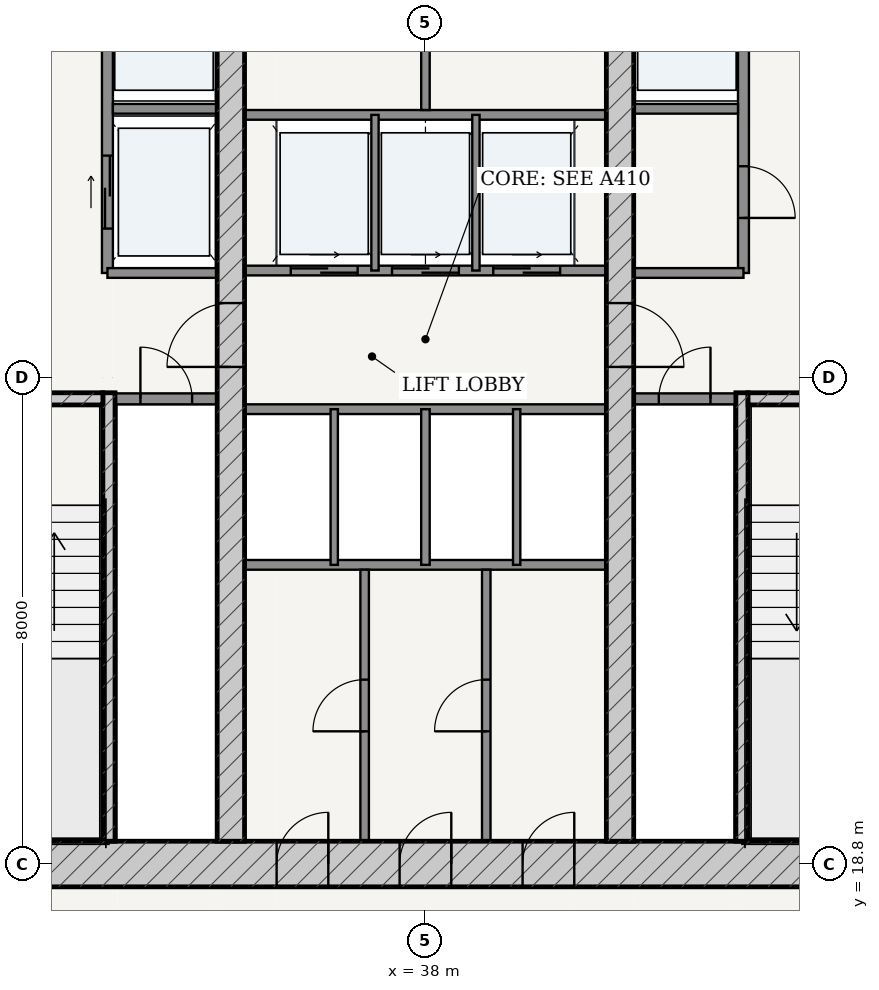
"""IFC4 building model, lengths in metres.
Left out: names, types, materials, properties, quantities, classifications, styles, units other than length and angle.
Written with IfcOpenShell. Run it as: python <this file> out.ifc"""

import sys

from ifc_helpers import new_model, si_unit, direction, frame, frame_2d, origin, place, context, subcontext, project, spatial, rectangle, extrude, source, transform, mapped, element, fill, save


model = new_model("IFC4")
c1 = context("Model", 3, precision=1e-05, world=origin(), true_north=direction((-0.2419218956, 0.970295726276)))
c2 = subcontext(c1, "Body", "Model", "MODEL_VIEW")
j1 = project(units=[si_unit("LENGTHUNIT", "METRE"), si_unit("PLANEANGLEUNIT", "RADIAN")], contexts=[c1])
p1 = place(None, origin())
s1 = spatial("IfcSite", under=j1, at=p1, CompositionType="ELEMENT")
p2 = place(p1, origin())
s2 = spatial("IfcBuilding", under=s1, at=p2, CompositionType="ELEMENT")
p3 = place(p2, frame((0.0, 0.0, 34.8)))
s3 = spatial("IfcBuildingStorey", under=s2, at=p3, CompositionType="ELEMENT", Elevation=34.8)
p4 = place(p3, frame((28.625, 18.8, 0.0), z_axis=(0.0, 0.0, 1.0), x_axis=(1.0, 0.0, 0.0)))
e1 = element("IfcWall", 1, at=p4, inside=s3, PredefinedType="SHEAR", context=c2, shape_type="SweptSolid", body=[
    extrude(rectangle(XDim=18.75, YDim=0.75, at=frame_2d((9.375, 0.0))), origin(), (0.0, 0.0, 1.0), 3.32),
])
p5 = place(p4, frame((6.927, 0.0, 0.0)))
e2 = element("IfcOpeningElement", 2, at=p5, cuts=e1, PredefinedType="OPENING", context=c2, shape_type="SweptSolid", body=[
    extrude(rectangle(XDim=0.85, YDim=2.1, at=frame_2d((0.425, 1.05))), frame((0.0, 0.385, 0.0), z_axis=(0.0, -1.0, 0.0), x_axis=(1.0, 0.0, 0.0)), (0.0, 0.0, 1.0), 0.77),
])
p6 = place(p4, frame((8.95, 0.0, 0.0)))
e3 = element("IfcOpeningElement", 3, at=p6, cuts=e1, PredefinedType="OPENING", context=c2, shape_type="SweptSolid", body=[
    extrude(rectangle(XDim=0.85, YDim=2.1, at=frame_2d((0.425, 1.05))), frame((0.0, 0.385, 0.0), z_axis=(0.0, -1.0, 0.0), x_axis=(1.0, 0.0, 0.0)), (0.0, 0.0, 1.0), 0.77),
])
p7 = place(p4, frame((10.972, 0.0, 0.0)))
e4 = element("IfcOpeningElement", 4, at=p7, cuts=e1, PredefinedType="OPENING", context=c2, shape_type="SweptSolid", body=[
    extrude(rectangle(XDim=0.85, YDim=2.1, at=frame_2d((0.425, 1.05))), frame((0.0, 0.385, 0.0), z_axis=(0.0, -1.0, 0.0), x_axis=(1.0, 0.0, 0.0)), (0.0, 0.0, 1.0), 0.77),
])
p8 = place(p3, frame((32.795, 19.175, 0.0), z_axis=(0.0, 0.0, 1.0), x_axis=(0.0, 1.0, 0.0)))
e5 = element("IfcWall", 5, at=p8, inside=s3, PredefinedType="SOLIDWALL", context=c2, shape_type="SweptSolid", body=[
    extrude(rectangle(XDim=7.375, YDim=0.2, at=frame_2d((3.688, 0.0))), origin(), (0.0, 0.0, 1.0), 3.32),
])
p9 = place(p3, frame((29.375, 26.45, 0.0), z_axis=(0.0, 0.0, 1.0), x_axis=(1.0, 0.0, 0.0)))
e6 = element("IfcWall", 6, at=p9, inside=s3, PredefinedType="SOLIDWALL", context=c2, shape_type="SweptSolid", body=[
    extrude(rectangle(XDim=3.32, YDim=0.2, at=frame_2d((1.66, 0.0))), origin(), (0.0, 0.0, 1.0), 3.32),
])
p10 = place(p9, frame((1.185, 0.0, 0.0)))
e7 = element("IfcOpeningElement", 7, at=p10, cuts=e6, PredefinedType="OPENING", context=c2, shape_type="SweptSolid", body=[
    extrude(rectangle(XDim=0.95, YDim=2.15, at=frame_2d((0.475, 1.075))), frame((0.0, 0.11, 0.0), z_axis=(0.0, -1.0, 0.0), x_axis=(1.0, 0.0, 0.0)), (0.0, 0.0, 1.0), 0.22),
])
p11 = place(p3, frame((43.205, 19.175, 0.0), z_axis=(0.0, 0.0, 1.0), x_axis=(0.0, 1.0, 0.0)))
e8 = element("IfcWall", 8, at=p11, inside=s3, PredefinedType="SOLIDWALL", context=c2, shape_type="SweptSolid", body=[
    extrude(rectangle(XDim=7.375, YDim=0.2, at=frame_2d((3.688, 0.0))), origin(), (0.0, 0.0, 1.0), 3.32),
])
p12 = place(p3, frame((43.305, 26.45, 0.0), z_axis=(0.0, 0.0, 1.0), x_axis=(1.0, 0.0, 0.0)))
e9 = element("IfcWall", 9, at=p12, inside=s3, PredefinedType="SOLIDWALL", context=c2, shape_type="SweptSolid", body=[
    extrude(rectangle(XDim=3.32, YDim=0.2, at=frame_2d((1.66, 0.0))), origin(), (0.0, 0.0, 1.0), 3.32),
])
p13 = place(p12, frame((1.185, 0.0, 0.0)))
e10 = element("IfcOpeningElement", 10, at=p13, cuts=e9, PredefinedType="OPENING", context=c2, shape_type="SweptSolid", body=[
    extrude(rectangle(XDim=0.95, YDim=2.15, at=frame_2d((0.475, 1.075))), frame((0.0, 0.11, 0.0), z_axis=(0.0, -1.0, 0.0), x_axis=(1.0, 0.0, 0.0)), (0.0, 0.0, 1.0), 0.22),
])
p14 = place(p3, frame((34.8, 19.175, 0.0), z_axis=(0.0, 0.0, 1.0), x_axis=(0.0, 1.0, 0.0)))
e11 = element("IfcWall", 11, at=p14, inside=s3, PredefinedType="SHEAR", context=c2, shape_type="SweptSolid", body=[
    extrude(rectangle(XDim=15.25, YDim=0.45, at=frame_2d((7.625, 0.0))), origin(), (0.0, 0.0, 1.0), 3.32),
])
p15 = place(p14, frame((7.8, 0.0, 0.0)))
e12 = element("IfcOpeningElement", 12, at=p15, cuts=e11, PredefinedType="OPENING", context=c2, shape_type="SweptSolid", body=[
    extrude(rectangle(XDim=1.05, YDim=2.15, at=frame_2d((0.525, 1.075))), frame((0.0, 0.235, 0.0), z_axis=(0.0, -1.0, 0.0), x_axis=(1.0, 0.0, 0.0)), (0.0, 0.0, 1.0), 0.47),
])
p16 = place(p3, frame((41.2, 19.175, 0.0), z_axis=(0.0, 0.0, 1.0), x_axis=(0.0, 1.0, 0.0)))
e13 = element("IfcWall", 13, at=p16, inside=s3, PredefinedType="SHEAR", context=c2, shape_type="SweptSolid", body=[
    extrude(rectangle(XDim=15.25, YDim=0.45, at=frame_2d((7.625, 0.0))), origin(), (0.0, 0.0, 1.0), 3.32),
])
p17 = place(p16, frame((7.8, 0.0, 0.0)))
e14 = element("IfcOpeningElement", 14, at=p17, cuts=e13, PredefinedType="OPENING", context=c2, shape_type="SweptSolid", body=[
    extrude(rectangle(XDim=1.05, YDim=2.15, at=frame_2d((0.525, 1.075))), frame((0.0, 0.235, 0.0), z_axis=(0.0, -1.0, 0.0), x_axis=(1.0, 0.0, 0.0)), (0.0, 0.0, 1.0), 0.47),
])
p18 = place(p3, frame((32.9, 26.45, 0.0), z_axis=(0.0, 0.0, 1.0), x_axis=(1.0, 0.0, 0.0)))
e15 = element("IfcWall", 15, at=p18, inside=s3, PredefinedType="PARTITIONING", context=c2, shape_type="SweptSolid", body=[
    extrude(rectangle(XDim=1.675, YDim=0.18, at=frame_2d((0.837, 0.0))), origin(), (0.0, 0.0, 1.0), 3.32),
])
p19 = place(p18, frame((0.413, 0.0, 0.0)))
e16 = element("IfcOpeningElement", 16, at=p19, cuts=e15, PredefinedType="OPENING", context=c2, shape_type="SweptSolid", body=[
    extrude(rectangle(XDim=0.85, YDim=2.1, at=frame_2d((0.425, 1.05))), frame((0.0, 0.1, 0.0), z_axis=(0.0, -1.0, 0.0), x_axis=(1.0, 0.0, 0.0)), (0.0, 0.0, 1.0), 0.2),
])
p20 = place(p3, frame((41.425, 26.45, 0.0), z_axis=(0.0, 0.0, 1.0), x_axis=(1.0, 0.0, 0.0)))
e17 = element("IfcWall", 17, at=p20, inside=s3, PredefinedType="PARTITIONING", context=c2, shape_type="SweptSolid", body=[
    extrude(rectangle(XDim=1.675, YDim=0.18, at=frame_2d((0.837, 0.0))), origin(), (0.0, 0.0, 1.0), 3.32),
])
p21 = place(p20, frame((0.413, 0.0, 0.0)))
e18 = element("IfcOpeningElement", 18, at=p21, cuts=e17, PredefinedType="OPENING", context=c2, shape_type="SweptSolid", body=[
    extrude(rectangle(XDim=0.85, YDim=2.1, at=frame_2d((0.425, 1.05))), frame((0.0, 0.1, 0.0), z_axis=(0.0, -1.0, 0.0), x_axis=(1.0, 0.0, 0.0)), (0.0, 0.0, 1.0), 0.2),
])
p22 = place(p3, frame((32.77, 28.52, 0.0), z_axis=(0.0, 0.0, 1.0), x_axis=(0.0, 1.0, 0.0)))
e19 = element("IfcWall", 19, at=p22, inside=s3, PredefinedType="PARTITIONING", context=c2, shape_type="SweptSolid", body=[
    extrude(rectangle(XDim=5.905, YDim=0.18, at=frame_2d((2.953, 0.0))), origin(), (0.0, 0.0, 1.0), 3.32),
])
p23 = place(p22, frame((3.655, 0.0, 0.0)))
e20 = element("IfcOpeningElement", 20, at=p23, cuts=e19, PredefinedType="OPENING", context=c2, shape_type="SweptSolid", body=[
    extrude(rectangle(XDim=1.15, YDim=2.2, at=frame_2d((0.575, 1.1))), frame((0.0, 0.1, 0.0), z_axis=(0.0, -1.0, 0.0), x_axis=(1.0, 0.0, 0.0)), (0.0, 0.0, 1.0), 0.2),
])
p24 = place(p22, frame((0.73, 0.0, 0.0)))
e21 = element("IfcOpeningElement", 21, at=p24, cuts=e19, PredefinedType="OPENING", context=c2, shape_type="SweptSolid", body=[
    extrude(rectangle(XDim=1.2, YDim=2.25, at=frame_2d((0.6, 1.125))), frame((0.0, 0.1, 0.0), z_axis=(0.0, -1.0, 0.0), x_axis=(1.0, 0.0, 0.0)), (0.0, 0.0, 1.0), 0.2),
])
p25 = place(p3, frame((32.86, 31.22, 0.0), z_axis=(0.0, 0.0, 1.0), x_axis=(1.0, 0.0, 0.0)))
e22 = element("IfcWall", 22, at=p25, inside=s3, PredefinedType="PARTITIONING", context=c2, shape_type="SweptSolid", body=[
    extrude(rectangle(XDim=1.715, YDim=0.16, at=frame_2d((0.857, 0.0))), origin(), (0.0, 0.0, 1.0), 3.32),
])
p26 = place(p3, frame((32.77, 28.52, 0.0), z_axis=(0.0, 0.0, 1.0), x_axis=(1.0, 0.0, 0.0)))
e23 = element("IfcWall", 23, at=p26, inside=s3, PredefinedType="PARTITIONING", context=c2, shape_type="SweptSolid", body=[
    extrude(rectangle(XDim=1.805, YDim=0.16, at=frame_2d((0.902, 0.0))), origin(), (0.0, 0.0, 1.0), 3.32),
])
p27 = place(p3, frame((43.23, 28.52, 0.0), z_axis=(0.0, 0.0, 1.0), x_axis=(0.0, 1.0, 0.0)))
e24 = element("IfcWall", 24, at=p27, inside=s3, PredefinedType="PARTITIONING", context=c2, shape_type="SweptSolid", body=[
    extrude(rectangle(XDim=5.905, YDim=0.18, at=frame_2d((2.953, 0.0))), origin(), (0.0, 0.0, 1.0), 3.32),
])
p28 = place(p27, frame((0.905, 0.0, 0.0)))
e25 = element("IfcOpeningElement", 25, at=p28, cuts=e24, PredefinedType="OPENING", context=c2, shape_type="SweptSolid", body=[
    extrude(rectangle(XDim=0.85, YDim=2.1, at=frame_2d((0.425, 1.05))), frame((0.0, 0.1, 0.0), z_axis=(0.0, -1.0, 0.0), x_axis=(1.0, 0.0, 0.0)), (0.0, 0.0, 1.0), 0.2),
])
p29 = place(p27, frame((3.655, 0.0, 0.0)))
e26 = element("IfcOpeningElement", 26, at=p29, cuts=e24, PredefinedType="OPENING", context=c2, shape_type="SweptSolid", body=[
    extrude(rectangle(XDim=1.15, YDim=2.2, at=frame_2d((0.575, 1.1))), frame((0.0, 0.1, 0.0), z_axis=(0.0, -1.0, 0.0), x_axis=(1.0, 0.0, 0.0)), (0.0, 0.0, 1.0), 0.2),
])
p30 = place(p3, frame((41.425, 31.22, 0.0), z_axis=(0.0, 0.0, 1.0), x_axis=(1.0, 0.0, 0.0)))
e27 = element("IfcWall", 27, at=p30, inside=s3, PredefinedType="PARTITIONING", context=c2, shape_type="SweptSolid", body=[
    extrude(rectangle(XDim=1.715, YDim=0.16, at=frame_2d((0.857, 0.0))), origin(), (0.0, 0.0, 1.0), 3.32),
])
p31 = place(p3, frame((41.425, 28.52, 0.0), z_axis=(0.0, 0.0, 1.0), x_axis=(1.0, 0.0, 0.0)))
e28 = element("IfcWall", 28, at=p31, inside=s3, PredefinedType="PARTITIONING", context=c2, shape_type="SweptSolid", body=[
    extrude(rectangle(XDim=1.805, YDim=0.16, at=frame_2d((0.902, 0.0))), origin(), (0.0, 0.0, 1.0), 3.32),
])
p32 = place(p3, frame((35.025, 28.56, 0.0), z_axis=(0.0, 0.0, 1.0), x_axis=(1.0, 0.0, 0.0)))
e29 = element("IfcWall", 29, at=p32, inside=s3, PredefinedType="PARTITIONING", context=c2, shape_type="SweptSolid", body=[
    extrude(rectangle(XDim=5.95, YDim=0.16, at=frame_2d((2.975, 0.0))), origin(), (0.0, 0.0, 1.0), 3.32),
])
p33 = place(p32, frame((0.76, 0.0, 0.0)))
e30 = element("IfcOpeningElement", 30, at=p33, cuts=e29, PredefinedType="OPENING", context=c2, shape_type="SweptSolid", body=[
    extrude(rectangle(XDim=1.1, YDim=2.2, at=frame_2d((0.55, 1.1))), frame((0.0, 0.09, 0.0), z_axis=(0.0, -1.0, 0.0), x_axis=(1.0, 0.0, 0.0)), (0.0, 0.0, 1.0), 0.18),
])
p34 = place(p32, frame((2.425, 0.0, 0.0)))
e31 = element("IfcOpeningElement", 31, at=p34, cuts=e29, PredefinedType="OPENING", context=c2, shape_type="SweptSolid", body=[
    extrude(rectangle(XDim=1.1, YDim=2.2, at=frame_2d((0.55, 1.1))), frame((0.0, 0.09, 0.0), z_axis=(0.0, -1.0, 0.0), x_axis=(1.0, 0.0, 0.0)), (0.0, 0.0, 1.0), 0.18),
])
p35 = place(p32, frame((4.09, 0.0, 0.0)))
e32 = element("IfcOpeningElement", 32, at=p35, cuts=e29, PredefinedType="OPENING", context=c2, shape_type="SweptSolid", body=[
    extrude(rectangle(XDim=1.1, YDim=2.2, at=frame_2d((0.55, 1.1))), frame((0.0, 0.09, 0.0), z_axis=(0.0, -1.0, 0.0), x_axis=(1.0, 0.0, 0.0)), (0.0, 0.0, 1.0), 0.18),
])
p36 = place(p3, frame((35.025, 31.12, 0.0), z_axis=(0.0, 0.0, 1.0), x_axis=(1.0, 0.0, 0.0)))
e33 = element("IfcWall", 33, at=p36, inside=s3, PredefinedType="PARTITIONING", context=c2, shape_type="SweptSolid", body=[
    extrude(rectangle(XDim=5.95, YDim=0.16, at=frame_2d((2.975, 0.0))), origin(), (0.0, 0.0, 1.0), 3.32),
])
for number, where, z_axis, x_axis in (
    (34, (37.17, 28.56, 0.0), (0.0, 0.0, 1.0), (0.0, 1.0, 0.0)),
    (35, (38.83, 28.56, 0.0), (0.0, 0.0, 1.0), (0.0, 1.0, 0.0)),
):
    element("IfcWall", number, at=place(p3, frame(where, z_axis=z_axis, x_axis=x_axis)), inside=s3, PredefinedType="PARTITIONING", context=c2, shape_type="SweptSolid", body=[
        extrude(rectangle(XDim=2.56, YDim=0.12, at=frame_2d((1.28, 0.0))), origin(), (0.0, 0.0, 1.0), 3.32),
    ])
p37 = place(p3, frame((38.0, 31.2, 0.0), z_axis=(0.0, 0.0, 1.0), x_axis=(0.0, 1.0, 0.0)))
e36 = element("IfcWall", 36, at=p37, inside=s3, PredefinedType="PARTITIONING", context=c2, shape_type="SweptSolid", body=[
    extrude(rectangle(XDim=3.225, YDim=0.14, at=frame_2d((1.613, 0.0))), origin(), (0.0, 0.0, 1.0), 3.32),
])
for number, where, z_axis, x_axis in (
    (37, (35.025, 26.28, 0.0), (0.0, 0.0, 1.0), (1.0, 0.0, 0.0)),
    (38, (35.025, 23.72, 0.0), (0.0, 0.0, 1.0), (1.0, 0.0, 0.0)),
):
    element("IfcWall", number, at=place(p3, frame(where, z_axis=z_axis, x_axis=x_axis)), inside=s3, PredefinedType="PARTITIONING", context=c2, shape_type="SweptSolid", body=[
        extrude(rectangle(XDim=5.95, YDim=0.16, at=frame_2d((2.975, 0.0))), origin(), (0.0, 0.0, 1.0), 3.32),
    ])
p38 = place(p3, frame((36.5, 23.72, 0.0), z_axis=(0.0, 0.0, 1.0), x_axis=(0.0, 1.0, 0.0)))
e39 = element("IfcWall", 39, at=p38, inside=s3, PredefinedType="PARTITIONING", context=c2, shape_type="SweptSolid", body=[
    extrude(rectangle(XDim=2.56, YDim=0.12, at=frame_2d((1.28, 0.0))), origin(), (0.0, 0.0, 1.0), 3.32),
])
p39 = place(p3, frame((38.0, 23.72, 0.0), z_axis=(0.0, 0.0, 1.0), x_axis=(0.0, 1.0, 0.0)))
e40 = element("IfcWall", 40, at=p39, inside=s3, PredefinedType="PARTITIONING", context=c2, shape_type="SweptSolid", body=[
    extrude(rectangle(XDim=2.56, YDim=0.14, at=frame_2d((1.28, 0.0))), origin(), (0.0, 0.0, 1.0), 3.32),
])
p40 = place(p3, frame((39.5, 23.72, 0.0), z_axis=(0.0, 0.0, 1.0), x_axis=(0.0, 1.0, 0.0)))
e41 = element("IfcWall", 41, at=p40, inside=s3, PredefinedType="PARTITIONING", context=c2, shape_type="SweptSolid", body=[
    extrude(rectangle(XDim=2.56, YDim=0.12, at=frame_2d((1.28, 0.0))), origin(), (0.0, 0.0, 1.0), 3.32),
])
p41 = place(p3, frame((37.0, 19.175, 0.0), z_axis=(0.0, 0.0, 1.0), x_axis=(0.0, 1.0, 0.0)))
e42 = element("IfcWall", 42, at=p41, inside=s3, PredefinedType="PARTITIONING", context=c2, shape_type="SweptSolid", body=[
    extrude(rectangle(XDim=4.465, YDim=0.14, at=frame_2d((2.232, 0.0))), origin(), (0.0, 0.0, 1.0), 3.32),
])
p42 = place(p41, frame((1.808, 0.0, 0.0)))
e43 = element("IfcOpeningElement", 43, at=p42, cuts=e42, PredefinedType="OPENING", context=c2, shape_type="SweptSolid", body=[
    extrude(rectangle(XDim=0.85, YDim=2.1, at=frame_2d((0.425, 1.05))), frame((0.0, 0.08, 0.0), z_axis=(0.0, -1.0, 0.0), x_axis=(1.0, 0.0, 0.0)), (0.0, 0.0, 1.0), 0.16),
])
p43 = place(p3, frame((39.0, 19.175, 0.0), z_axis=(0.0, 0.0, 1.0), x_axis=(0.0, 1.0, 0.0)))
e44 = element("IfcWall", 44, at=p43, inside=s3, PredefinedType="PARTITIONING", context=c2, shape_type="SweptSolid", body=[
    extrude(rectangle(XDim=4.465, YDim=0.14, at=frame_2d((2.232, 0.0))), origin(), (0.0, 0.0, 1.0), 3.32),
])
p44 = place(p43, frame((1.808, 0.0, 0.0)))
e45 = element("IfcOpeningElement", 45, at=p44, cuts=e44, PredefinedType="OPENING", context=c2, shape_type="SweptSolid", body=[
    extrude(rectangle(XDim=0.85, YDim=2.1, at=frame_2d((0.425, 1.05))), frame((0.0, 0.08, 0.0), z_axis=(0.0, -1.0, 0.0), x_axis=(1.0, 0.0, 0.0)), (0.0, 0.0, 1.0), 0.16),
])
m1 = source(origin(), c2, "Body", "SweptSolid", [
    extrude(rectangle(XDim=1.05, YDim=2.15, at=frame_2d((0.525, 1.075))), frame((0.0, 0.025, 0.0), z_axis=(0.0, -1.0, 0.0), x_axis=(1.0, 0.0, 0.0)), (0.0, 0.0, 1.0), 0.05),
])
p45 = place(p15, origin())
e46 = element("IfcDoor", 46, at=p45, inside=s3, OperationType="SINGLE_SWING_LEFT", PredefinedType="DOOR", context=c2, shape_type="MappedRepresentation", body=[
    mapped(m1, transform((0.0, 0.0, 0.0), scale=1.0)),
])
fill(e12, e46)
p46 = place(p17, frame((1.05, 0.0, 0.0), z_axis=(0.0, 0.0, 1.0), x_axis=(-1.0, 0.0, 0.0)))
e47 = element("IfcDoor", 47, at=p46, inside=s3, OperationType="SINGLE_SWING_RIGHT", PredefinedType="DOOR", context=c2, shape_type="MappedRepresentation", body=[
    mapped(m1, transform((0.0, 0.0, 0.0), scale=1.0)),
])
fill(e14, e47)
m2 = source(origin(), c2, "Body", "SweptSolid", [
    extrude(rectangle(XDim=0.85, YDim=2.1, at=frame_2d((0.425, 1.05))), frame((0.0, 0.025, 0.0), z_axis=(0.0, -1.0, 0.0), x_axis=(1.0, 0.0, 0.0)), (0.0, 0.0, 1.0), 0.05),
])
p47 = place(p19, origin())
e48 = element("IfcDoor", 48, at=p47, inside=s3, OperationType="SINGLE_SWING_LEFT", PredefinedType="DOOR", context=c2, shape_type="MappedRepresentation", body=[
    mapped(m2, transform((0.0, 0.0, 0.0), scale=1.0)),
])
fill(e16, e48)
p48 = place(p21, origin())
e49 = element("IfcDoor", 49, at=p48, inside=s3, OperationType="SINGLE_SWING_RIGHT", PredefinedType="DOOR", context=c2, shape_type="MappedRepresentation", body=[
    mapped(m2, transform((0.0, 0.0, 0.0), scale=1.0)),
])
fill(e18, e49)
p49 = place(p28, frame((0.85, 0.0, 0.0), z_axis=(0.0, 0.0, 1.0), x_axis=(-1.0, 0.0, 0.0)))
e50 = element("IfcDoor", 50, at=p49, inside=s3, OperationType="SINGLE_SWING_RIGHT", PredefinedType="DOOR", context=c2, shape_type="MappedRepresentation", body=[
    mapped(m2, transform((0.0, 0.0, 0.0), scale=1.0)),
])
fill(e25, e50)
p50 = place(p5, origin())
e51 = element("IfcDoor", 51, at=p50, inside=s3, OperationType="SINGLE_SWING_RIGHT", PredefinedType="DOOR", context=c2, shape_type="MappedRepresentation", body=[
    mapped(m2, transform((0.0, 0.0, 0.0), scale=1.0)),
])
fill(e2, e51)
p51 = place(p6, origin())
e52 = element("IfcDoor", 52, at=p51, inside=s3, OperationType="SINGLE_SWING_RIGHT", PredefinedType="DOOR", context=c2, shape_type="MappedRepresentation", body=[
    mapped(m2, transform((0.0, 0.0, 0.0), scale=1.0)),
])
fill(e3, e52)
p52 = place(p7, origin())
e53 = element("IfcDoor", 53, at=p52, inside=s3, OperationType="SINGLE_SWING_RIGHT", PredefinedType="DOOR", context=c2, shape_type="MappedRepresentation", body=[
    mapped(m2, transform((0.0, 0.0, 0.0), scale=1.0)),
])
fill(e4, e53)
p53 = place(p42, origin())
e54 = element("IfcDoor", 54, at=p53, inside=s3, OperationType="SINGLE_SWING_LEFT", PredefinedType="DOOR", context=c2, shape_type="MappedRepresentation", body=[
    mapped(m2, transform((0.0, 0.0, 0.0), scale=1.0)),
])
fill(e43, e54)
p54 = place(p44, origin())
e55 = element("IfcDoor", 55, at=p54, inside=s3, OperationType="SINGLE_SWING_LEFT", PredefinedType="DOOR", context=c2, shape_type="MappedRepresentation", body=[
    mapped(m2, transform((0.0, 0.0, 0.0), scale=1.0)),
])
fill(e45, e55)
m3 = source(origin(), c2, "Body", "SweptSolid", [
    extrude(rectangle(XDim=1.2, YDim=2.25, at=frame_2d((0.6, 1.125))), frame((0.0, 0.025, 0.0), z_axis=(0.0, -1.0, 0.0), x_axis=(1.0, 0.0, 0.0)), (0.0, 0.0, 1.0), 0.05),
])
p55 = place(p24, origin())
e56 = element("IfcDoor", 56, at=p55, inside=s3, OperationType="DOUBLE_DOOR_SLIDING", PredefinedType="DOOR", context=c2, shape_type="MappedRepresentation", body=[
    mapped(m3, transform((0.0, 0.0, 0.0), scale=1.0)),
])
fill(e21, e56)
m4 = source(origin(), c2, "Body", "SweptSolid", [
    extrude(rectangle(XDim=1.1, YDim=2.2, at=frame_2d((0.55, 1.1))), frame((0.0, 0.025, 0.0), z_axis=(0.0, -1.0, 0.0), x_axis=(1.0, 0.0, 0.0)), (0.0, 0.0, 1.0), 0.05),
])
p56 = place(p33, origin())
e57 = element("IfcDoor", 57, at=p56, inside=s3, OperationType="DOUBLE_DOOR_SLIDING", PredefinedType="DOOR", context=c2, shape_type="MappedRepresentation", body=[
    mapped(m4, transform((0.0, 0.0, 0.0), scale=1.0)),
])
fill(e30, e57)
p57 = place(p34, origin())
e58 = element("IfcDoor", 58, at=p57, inside=s3, OperationType="DOUBLE_DOOR_SLIDING", PredefinedType="DOOR", context=c2, shape_type="MappedRepresentation", body=[
    mapped(m4, transform((0.0, 0.0, 0.0), scale=1.0)),
])
fill(e31, e58)
p58 = place(p35, origin())
e59 = element("IfcDoor", 59, at=p58, inside=s3, OperationType="DOUBLE_DOOR_SLIDING", PredefinedType="DOOR", context=c2, shape_type="MappedRepresentation", body=[
    mapped(m4, transform((0.0, 0.0, 0.0), scale=1.0)),
])
fill(e32, e59)
save(model, sys.argv[1])
